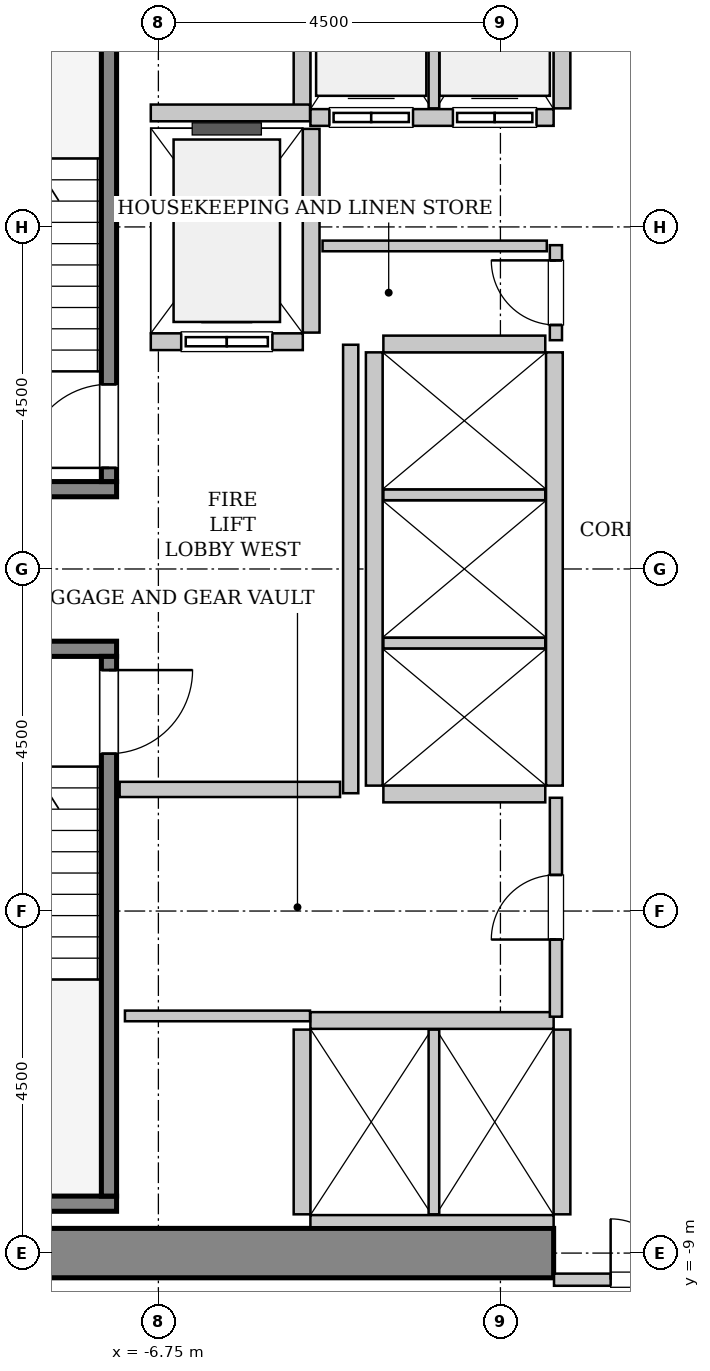
"""IFC4 building model, lengths in metres.
Left out: names, types, materials, properties, quantities, classifications, styles, units other than length and angle.
Written with IfcOpenShell. Run it as: python <this file> out.ifc"""

import sys

from ifc_helpers import new_model, si_unit, direction, frame, frame_2d, origin, place, context, subcontext, project, spatial, rectangle, extrude, source, transform, mapped, element, fill, save


model = new_model("IFC4")
c1 = context("Model", 3, precision=1e-05, world=origin(), true_north=direction((0.0, 1.0)))
c2 = subcontext(c1, "Body", "Model", "MODEL_VIEW")
j1 = project(units=[si_unit("LENGTHUNIT", "METRE"), si_unit("PLANEANGLEUNIT", "RADIAN")], contexts=[c1])
p1 = place(None, origin())
s1 = spatial("IfcSite", under=j1, at=p1, CompositionType="ELEMENT")
p2 = place(p1, origin())
s2 = spatial("IfcBuilding", under=s1, at=p2, CompositionType="ELEMENT")
p3 = place(p2, frame((0.0, 0.0, 67.2)))
s3 = spatial("IfcBuildingStorey", under=s2, at=p3, CompositionType="ELEMENT", Elevation=67.2)
m1 = source(origin(), c2, "Body", "SweptSolid", [
    extrude(rectangle(XDim=10.025, YDim=0.65, at=frame_2d((5.012, 0.0))), origin(), (0.0, 0.0, 1.0), 3.8),
])
p4 = place(p3, frame((-11.575, -9.0, 0.0), z_axis=(0.0, 0.0, 1.0), x_axis=(1.0, 0.0, 0.0)))
e1 = element("IfcWall", 1, at=p4, inside=s3, PredefinedType="SHEAR", context=c2, shape_type="MappedRepresentation", body=[
    mapped(m1, transform((0.0, 0.0, 0.0), x_axis=(1.0, 0.0, 0.0), y_axis=(0.0, 1.0, 0.0), z_axis=(0.0, 0.0, 1.0), scale=1.0)),
])
m2 = source(origin(), c2, "Body", "SweptSolid", [
    extrude(rectangle(XDim=3.4, YDim=0.2, at=frame_2d((1.7, 0.0))), origin(), (0.0, 0.0, 1.0), 3.8),
])
p5 = place(p3, frame((-7.3, 1.05, 0.0), z_axis=(0.0, 0.0, 1.0), x_axis=(-1.0, 0.0, 0.0)))
e2 = element("IfcWall", 2, at=p5, inside=s3, PredefinedType="SOLIDWALL", context=c2, shape_type="MappedRepresentation", body=[
    mapped(m2, transform((0.0, 0.0, 0.0), x_axis=(1.0, 0.0, 0.0), y_axis=(0.0, 1.0, 0.0), z_axis=(0.0, 0.0, 1.0), scale=1.0)),
])
m3 = source(origin(), c2, "Body", "SweptSolid", [
    extrude(rectangle(XDim=7.1, YDim=0.2, at=frame_2d((3.55, 0.0))), origin(), (0.0, 0.0, 1.0), 3.8),
])
p6 = place(p3, frame((-7.4, 1.15, 0.0), z_axis=(0.0, 0.0, 1.0), x_axis=(0.0, 1.0, 0.0)))
e3 = element("IfcWall", 3, at=p6, inside=s3, PredefinedType="SOLIDWALL", context=c2, shape_type="MappedRepresentation", body=[
    mapped(m3, transform((0.0, 0.0, 0.0), x_axis=(1.0, 0.0, 0.0), y_axis=(0.0, 1.0, 0.0), z_axis=(0.0, 0.0, 1.0), scale=1.0)),
])
p7 = place(p6, frame((0.18, 0.0, 0.0)))
e4 = element("IfcOpeningElement", 4, at=p7, cuts=e3, PredefinedType="OPENING", context=c2, shape_type="SweptSolid", body=[
    extrude(rectangle(XDim=1.1, YDim=2.15, at=frame_2d((0.55, 1.075))), frame((0.0, 0.11, 0.0), z_axis=(0.0, -1.0, 0.0), x_axis=(1.0, 0.0, 0.0)), (0.0, 0.0, 1.0), 0.22),
])
p8 = place(p3, frame((-10.7, -1.05, 0.0), z_axis=(0.0, 0.0, 1.0), x_axis=(1.0, 0.0, 0.0)))
e5 = element("IfcWall", 5, at=p8, inside=s3, PredefinedType="SOLIDWALL", context=c2, shape_type="MappedRepresentation", body=[
    mapped(m2, transform((0.0, 0.0, 0.0), x_axis=(1.0, 0.0, 0.0), y_axis=(0.0, 1.0, 0.0), z_axis=(0.0, 0.0, 1.0), scale=1.0)),
])
m4 = source(origin(), c2, "Body", "SweptSolid", [
    extrude(rectangle(XDim=3.63, YDim=0.2, at=frame_2d((1.815, 0.0))), origin(), (0.0, 0.0, 1.0), 3.8),
])
p9 = place(p3, frame((-10.93, -8.35, 0.0), z_axis=(0.0, 0.0, 1.0), x_axis=(1.0, 0.0, 0.0)))
e6 = element("IfcWall", 6, at=p9, inside=s3, PredefinedType="SOLIDWALL", context=c2, shape_type="MappedRepresentation", body=[
    mapped(m4, transform((0.0, 0.0, 0.0), x_axis=(1.0, 0.0, 0.0), y_axis=(0.0, 1.0, 0.0), z_axis=(0.0, 0.0, 1.0), scale=1.0)),
])
p10 = place(p3, frame((-7.4, -1.15, 0.0), z_axis=(0.0, 0.0, 1.0), x_axis=(0.0, -1.0, 0.0)))
e7 = element("IfcWall", 7, at=p10, inside=s3, PredefinedType="SOLIDWALL", context=c2, shape_type="MappedRepresentation", body=[
    mapped(m3, transform((0.0, 0.0, 0.0), x_axis=(1.0, 0.0, 0.0), y_axis=(0.0, 1.0, 0.0), z_axis=(0.0, 0.0, 1.0), scale=1.0)),
])
p11 = place(p10, frame((0.18, 0.0, 0.0)))
e8 = element("IfcOpeningElement", 8, at=p11, cuts=e7, PredefinedType="OPENING", context=c2, shape_type="SweptSolid", body=[
    extrude(rectangle(XDim=1.1, YDim=2.15, at=frame_2d((0.55, 1.075))), frame((0.0, 0.11, 0.0), z_axis=(0.0, -1.0, 0.0), x_axis=(1.0, 0.0, 0.0)), (0.0, 0.0, 1.0), 0.22),
])
m5 = source(origin(), c2, "Body", "SweptSolid", [
    extrude(rectangle(XDim=2.0, YDim=0.22, at=frame_2d((1.0, 0.0))), origin(), (0.0, 0.0, 1.0), 3.535),
])
p12 = place(p3, frame((-6.85, 2.99, 0.0), z_axis=(0.0, 0.0, 1.0), x_axis=(1.0, 0.0, 0.0)))
e9 = element("IfcWall", 9, at=p12, inside=s3, PredefinedType="SOLIDWALL", context=c2, shape_type="MappedRepresentation", body=[
    mapped(m5, transform((0.0, 0.0, 0.0), x_axis=(1.0, 0.0, 0.0), y_axis=(0.0, 1.0, 0.0), z_axis=(0.0, 0.0, 1.0), scale=1.0)),
])
p13 = place(p12, frame((0.4, 0.0, 0.0)))
e10 = element("IfcOpeningElement", 10, at=p13, cuts=e9, PredefinedType="OPENING", context=c2, shape_type="SweptSolid", body=[
    extrude(rectangle(XDim=1.2, YDim=2.2, at=frame_2d((0.6, 1.1))), frame((0.0, 0.12, 0.0), z_axis=(0.0, -1.0, 0.0), x_axis=(1.0, 0.0, 0.0)), (0.0, 0.0, 1.0), 0.24),
])
m6 = source(origin(), c2, "Body", "SweptSolid", [
    extrude(rectangle(XDim=2.68, YDim=0.22, at=frame_2d((1.34, 0.0))), origin(), (0.0, 0.0, 1.0), 3.535),
])
p14 = place(p3, frame((-4.74, 3.11, 0.0), z_axis=(0.0, 0.0, 1.0), x_axis=(0.0, 1.0, 0.0)))
e11 = element("IfcWall", 11, at=p14, inside=s3, PredefinedType="SOLIDWALL", context=c2, shape_type="MappedRepresentation", body=[
    mapped(m6, transform((0.0, 0.0, 0.0), x_axis=(1.0, 0.0, 0.0), y_axis=(0.0, 1.0, 0.0), z_axis=(0.0, 0.0, 1.0), scale=1.0)),
])
m7 = source(origin(), c2, "Body", "SweptSolid", [
    extrude(rectangle(XDim=3.2, YDim=0.22, at=frame_2d((1.6, 0.0))), origin(), (0.0, 0.0, 1.0), 3.535),
])
p15 = place(p3, frame((-4.75, 5.94, 0.0), z_axis=(0.0, 0.0, 1.0), x_axis=(1.0, 0.0, 0.0)))
e12 = element("IfcWall", 12, at=p15, inside=s3, PredefinedType="SOLIDWALL", context=c2, shape_type="MappedRepresentation", body=[
    mapped(m7, transform((0.0, 0.0, 0.0), x_axis=(1.0, 0.0, 0.0), y_axis=(0.0, 1.0, 0.0), z_axis=(0.0, 0.0, 1.0), scale=1.0)),
])
p16 = place(p15, frame((0.25, 0.0, 0.0)))
e13 = element("IfcOpeningElement", 13, at=p16, cuts=e12, PredefinedType="OPENING", context=c2, shape_type="SweptSolid", body=[
    extrude(rectangle(XDim=1.1, YDim=2.2, at=frame_2d((0.55, 1.1))), frame((0.0, 0.12, 0.0), z_axis=(0.0, -1.0, 0.0), x_axis=(1.0, 0.0, 0.0)), (0.0, 0.0, 1.0), 0.24),
])
p17 = place(p15, frame((1.875, 0.0, 0.0)))
e14 = element("IfcOpeningElement", 14, at=p17, cuts=e12, PredefinedType="OPENING", context=c2, shape_type="SweptSolid", body=[
    extrude(rectangle(XDim=1.1, YDim=2.2, at=frame_2d((0.55, 1.1))), frame((0.0, 0.12, 0.0), z_axis=(0.0, -1.0, 0.0), x_axis=(1.0, 0.0, 0.0)), (0.0, 0.0, 1.0), 0.24),
])
m8 = source(origin(), c2, "Body", "SweptSolid", [
    extrude(rectangle(XDim=2.43, YDim=0.22, at=frame_2d((1.215, 0.0))), origin(), (0.0, 0.0, 1.0), 3.535),
])
p18 = place(p3, frame((-4.86, 8.49, 0.0), z_axis=(0.0, 0.0, 1.0), x_axis=(0.0, -1.0, 0.0)))
e15 = element("IfcWall", 15, at=p18, inside=s3, PredefinedType="SOLIDWALL", context=c2, shape_type="MappedRepresentation", body=[
    mapped(m8, transform((0.0, 0.0, 0.0), x_axis=(1.0, 0.0, 0.0), y_axis=(0.0, 1.0, 0.0), z_axis=(0.0, 0.0, 1.0), scale=1.0)),
])
m9 = source(origin(), c2, "Body", "SweptSolid", [
    extrude(rectangle(XDim=2.43, YDim=0.14, at=frame_2d((1.215, 0.0))), origin(), (0.0, 0.0, 1.0), 3.535),
])
p19 = place(p3, frame((-3.125, 6.06, 0.0), z_axis=(0.0, 0.0, 1.0), x_axis=(0.0, 1.0, 0.0)))
e16 = element("IfcWall", 16, at=p19, inside=s3, PredefinedType="PARTITIONING", context=c2, shape_type="MappedRepresentation", body=[
    mapped(m9, transform((0.0, 0.0, 0.0), x_axis=(1.0, 0.0, 0.0), y_axis=(0.0, 1.0, 0.0), z_axis=(0.0, 0.0, 1.0), scale=1.0)),
])
p20 = place(p3, frame((-1.44, 6.06, 0.0), z_axis=(0.0, 0.0, 1.0), x_axis=(0.0, 1.0, 0.0)))
e17 = element("IfcWall", 17, at=p20, inside=s3, PredefinedType="SOLIDWALL", context=c2, shape_type="MappedRepresentation", body=[
    mapped(m8, transform((0.0, 0.0, 0.0), x_axis=(1.0, 0.0, 0.0), y_axis=(0.0, 1.0, 0.0), z_axis=(0.0, 0.0, 1.0), scale=1.0)),
])
p21 = place(p3, frame((-1.55, -5.94, 0.0), z_axis=(0.0, 0.0, 1.0), x_axis=(-1.0, 0.0, 0.0)))
e18 = element("IfcWall", 18, at=p21, inside=s3, PredefinedType="SOLIDWALL", context=c2, shape_type="MappedRepresentation", body=[
    mapped(m7, transform((0.0, 0.0, 0.0), x_axis=(1.0, 0.0, 0.0), y_axis=(0.0, 1.0, 0.0), z_axis=(0.0, 0.0, 1.0), scale=1.0)),
])
m10 = source(origin(), c2, "Body", "SweptSolid", [
    extrude(rectangle(XDim=3.2, YDim=0.16, at=frame_2d((1.6, 0.0))), origin(), (0.0, 0.0, 1.0), 2.425),
])
p22 = place(p3, frame((-4.75, -8.58, 0.0), z_axis=(0.0, 0.0, 1.0), x_axis=(1.0, 0.0, 0.0)))
e19 = element("IfcWall", 19, at=p22, inside=s3, PredefinedType="PARTITIONING", context=c2, shape_type="MappedRepresentation", body=[
    mapped(m10, transform((0.0, 0.0, 0.0), x_axis=(1.0, 0.0, 0.0), y_axis=(0.0, 1.0, 0.0), z_axis=(0.0, 0.0, 1.0), scale=1.0)),
])
p23 = place(p3, frame((-4.86, -6.06, 0.0), z_axis=(0.0, 0.0, 1.0), x_axis=(0.0, -1.0, 0.0)))
e20 = element("IfcWall", 20, at=p23, inside=s3, PredefinedType="SOLIDWALL", context=c2, shape_type="MappedRepresentation", body=[
    mapped(m8, transform((0.0, 0.0, 0.0), x_axis=(1.0, 0.0, 0.0), y_axis=(0.0, 1.0, 0.0), z_axis=(0.0, 0.0, 1.0), scale=1.0)),
])
p24 = place(p3, frame((-3.125, -8.49, 0.0), z_axis=(0.0, 0.0, 1.0), x_axis=(0.0, 1.0, 0.0)))
e21 = element("IfcWall", 21, at=p24, inside=s3, PredefinedType="PARTITIONING", context=c2, shape_type="MappedRepresentation", body=[
    mapped(m9, transform((0.0, 0.0, 0.0), x_axis=(1.0, 0.0, 0.0), y_axis=(0.0, 1.0, 0.0), z_axis=(0.0, 0.0, 1.0), scale=1.0)),
])
p25 = place(p3, frame((-1.44, -8.49, 0.0), z_axis=(0.0, 0.0, 1.0), x_axis=(0.0, 1.0, 0.0)))
e22 = element("IfcWall", 22, at=p25, inside=s3, PredefinedType="SOLIDWALL", context=c2, shape_type="MappedRepresentation", body=[
    mapped(m8, transform((0.0, 0.0, 0.0), x_axis=(1.0, 0.0, 0.0), y_axis=(0.0, 1.0, 0.0), z_axis=(0.0, 0.0, 1.0), scale=1.0)),
])
m11 = source(origin(), c2, "Body", "SweptSolid", [
    extrude(rectangle(XDim=5.7, YDim=0.22, at=frame_2d((2.85, 0.0))), origin(), (0.0, 0.0, 1.0), 3.535),
])
for number, where, z_axis, x_axis in (
    (23, (-1.54, -2.85, 0.0), (0.0, 0.0, 1.0), (0.0, 1.0, 0.0)),
    (24, (-3.91, 2.85, 0.0), (0.0, 0.0, 1.0), (0.0, -1.0, 0.0)),
):
    element("IfcWall", number, at=place(p3, frame(where, z_axis=z_axis, x_axis=x_axis)), inside=s3, PredefinedType="SOLIDWALL", context=c2, shape_type="MappedRepresentation", body=[
        mapped(m11, transform((0.0, 0.0, 0.0), x_axis=(1.0, 0.0, 0.0), y_axis=(0.0, 1.0, 0.0), z_axis=(0.0, 0.0, 1.0), scale=1.0)),
    ])
m12 = source(origin(), c2, "Body", "SweptSolid", [
    extrude(rectangle(XDim=2.13, YDim=0.22, at=frame_2d((1.065, 0.0))), origin(), (0.0, 0.0, 1.0), 3.535),
])
p26 = place(p3, frame((-3.79, -2.96, 0.0), z_axis=(0.0, 0.0, 1.0), x_axis=(1.0, 0.0, 0.0)))
e25 = element("IfcWall", 25, at=p26, inside=s3, PredefinedType="SOLIDWALL", context=c2, shape_type="MappedRepresentation", body=[
    mapped(m12, transform((0.0, 0.0, 0.0), x_axis=(1.0, 0.0, 0.0), y_axis=(0.0, 1.0, 0.0), z_axis=(0.0, 0.0, 1.0), scale=1.0)),
])
m13 = source(origin(), c2, "Body", "SweptSolid", [
    extrude(rectangle(XDim=2.13, YDim=0.14, at=frame_2d((1.065, 0.0))), origin(), (0.0, 0.0, 1.0), 3.535),
])
for number, where, z_axis, x_axis in (
    (26, (-3.79, -0.975, 0.0), (0.0, 0.0, 1.0), (1.0, 0.0, 0.0)),
    (27, (-3.79, 0.975, 0.0), (0.0, 0.0, 1.0), (1.0, 0.0, 0.0)),
):
    element("IfcWall", number, at=place(p3, frame(where, z_axis=z_axis, x_axis=x_axis)), inside=s3, PredefinedType="PARTITIONING", context=c2, shape_type="MappedRepresentation", body=[
        mapped(m13, transform((0.0, 0.0, 0.0), x_axis=(1.0, 0.0, 0.0), y_axis=(0.0, 1.0, 0.0), z_axis=(0.0, 0.0, 1.0), scale=1.0)),
    ])
p27 = place(p3, frame((-1.66, 2.96, 0.0), z_axis=(0.0, 0.0, 1.0), x_axis=(-1.0, 0.0, 0.0)))
e28 = element("IfcWall", 28, at=p27, inside=s3, PredefinedType="SOLIDWALL", context=c2, shape_type="MappedRepresentation", body=[
    mapped(m12, transform((0.0, 0.0, 0.0), x_axis=(1.0, 0.0, 0.0), y_axis=(0.0, 1.0, 0.0), z_axis=(0.0, 0.0, 1.0), scale=1.0)),
])
m14 = source(origin(), c2, "Body", "SweptSolid", [
    extrude(rectangle(XDim=2.095, YDim=0.22, at=frame_2d((1.048, 0.0))), origin(), (0.0, 0.0, 1.0), 3.535),
])
p28 = place(p3, frame((-6.85, 6.0, 0.0), z_axis=(0.0, 0.0, 1.0), x_axis=(1.0, 0.0, 0.0)))
e29 = element("IfcWall", 29, at=p28, inside=s3, PredefinedType="SOLIDWALL", context=c2, shape_type="MappedRepresentation", body=[
    mapped(m14, transform((0.0, 0.0, 0.0), x_axis=(1.0, 0.0, 0.0), y_axis=(0.0, 1.0, 0.0), z_axis=(0.0, 0.0, 1.0), scale=1.0)),
])
m15 = source(origin(), c2, "Body", "SweptSolid", [
    extrude(rectangle(XDim=5.9, YDim=0.2, at=frame_2d((2.95, 0.0))), origin(), (0.0, 0.0, 1.0), 3.535),
])
p29 = place(p3, frame((-4.22, -2.95, 0.0), z_axis=(0.0, 0.0, 1.0), x_axis=(0.0, 1.0, 0.0)))
e30 = element("IfcWall", 30, at=p29, inside=s3, PredefinedType="PARTITIONING", context=c2, shape_type="MappedRepresentation", body=[
    mapped(m15, transform((0.0, 0.0, 0.0), x_axis=(1.0, 0.0, 0.0), y_axis=(0.0, 1.0, 0.0), z_axis=(0.0, 0.0, 1.0), scale=1.0)),
])
m16 = source(origin(), c2, "Body", "SweptSolid", [
    extrude(rectangle(XDim=2.9, YDim=0.2, at=frame_2d((1.45, 0.0))), origin(), (0.0, 0.0, 1.0), 3.535),
])
p30 = place(p3, frame((-7.26, -2.9, 0.0), z_axis=(0.0, 0.0, 1.0), x_axis=(1.0, 0.0, 0.0)))
e31 = element("IfcWall", 31, at=p30, inside=s3, PredefinedType="PARTITIONING", context=c2, shape_type="MappedRepresentation", body=[
    mapped(m16, transform((0.0, 0.0, 0.0), x_axis=(1.0, 0.0, 0.0), y_axis=(0.0, 1.0, 0.0), z_axis=(0.0, 0.0, 1.0), scale=1.0)),
])
m17 = source(origin(), c2, "Body", "SweptSolid", [
    extrude(rectangle(XDim=3.09, YDim=0.16, at=frame_2d((1.545, 0.0))), origin(), (0.0, 0.0, 1.0), 2.425),
])
p31 = place(p3, frame((-1.545, -9.35, 0.0), z_axis=(0.0, 0.0, 1.0), x_axis=(1.0, 0.0, 0.0)))
e32 = element("IfcWall", 32, at=p31, inside=s3, PredefinedType="PARTITIONING", context=c2, shape_type="MappedRepresentation", body=[
    mapped(m17, transform((0.0, 0.0, 0.0), x_axis=(1.0, 0.0, 0.0), y_axis=(0.0, 1.0, 0.0), z_axis=(0.0, 0.0, 1.0), scale=1.0)),
])
p32 = place(p31, frame((0.745, 0.0, 0.0)))
e33 = element("IfcOpeningElement", 33, at=p32, cuts=e32, PredefinedType="OPENING", context=c2, shape_type="SweptSolid", body=[
    extrude(rectangle(XDim=1.6, YDim=2.3, at=frame_2d((0.8, 1.15))), frame((0.0, 0.09, 0.0), z_axis=(0.0, -1.0, 0.0), x_axis=(1.0, 0.0, 0.0)), (0.0, 0.0, 1.0), 0.18),
])
m18 = source(origin(), c2, "Body", "SweptSolid", [
    extrude(rectangle(XDim=1.25, YDim=0.16, at=frame_2d((0.625, 0.0))), origin(), (0.0, 0.0, 1.0), 3.535),
])
p33 = place(p3, frame((-1.52, 3.01, 0.0), z_axis=(0.0, 0.0, 1.0), x_axis=(0.0, 1.0, 0.0)))
e34 = element("IfcWall", 34, at=p33, inside=s3, PredefinedType="PARTITIONING", context=c2, shape_type="MappedRepresentation", body=[
    mapped(m18, transform((0.0, 0.0, 0.0), x_axis=(1.0, 0.0, 0.0), y_axis=(0.0, 1.0, 0.0), z_axis=(0.0, 0.0, 1.0), scale=1.0)),
])
p34 = place(p33, frame((0.2, 0.0, 0.0)))
e35 = element("IfcOpeningElement", 35, at=p34, cuts=e34, PredefinedType="OPENING", context=c2, shape_type="SweptSolid", body=[
    extrude(rectangle(XDim=0.85, YDim=2.1, at=frame_2d((0.425, 1.05))), frame((0.0, 0.09, 0.0), z_axis=(0.0, -1.0, 0.0), x_axis=(1.0, 0.0, 0.0)), (0.0, 0.0, 1.0), 0.18),
])
m19 = source(origin(), c2, "Body", "SweptSolid", [
    extrude(rectangle(XDim=2.95, YDim=0.14, at=frame_2d((1.475, 0.0))), origin(), (0.0, 0.0, 1.0), 3.535),
])
p35 = place(p3, frame((-4.59, 4.25, 0.0), z_axis=(0.0, 0.0, 1.0), x_axis=(1.0, 0.0, 0.0)))
e36 = element("IfcWall", 36, at=p35, inside=s3, PredefinedType="PARTITIONING", context=c2, shape_type="MappedRepresentation", body=[
    mapped(m19, transform((0.0, 0.0, 0.0), x_axis=(1.0, 0.0, 0.0), y_axis=(0.0, 1.0, 0.0), z_axis=(0.0, 0.0, 1.0), scale=1.0)),
])
m20 = source(origin(), c2, "Body", "SweptSolid", [
    extrude(rectangle(XDim=2.88, YDim=0.16, at=frame_2d((1.44, 0.0))), origin(), (0.0, 0.0, 1.0), 3.535),
])
p36 = place(p3, frame((-1.52, -5.89, 0.0), z_axis=(0.0, 0.0, 1.0), x_axis=(0.0, 1.0, 0.0)))
e37 = element("IfcWall", 37, at=p36, inside=s3, PredefinedType="PARTITIONING", context=c2, shape_type="MappedRepresentation", body=[
    mapped(m20, transform((0.0, 0.0, 0.0), x_axis=(1.0, 0.0, 0.0), y_axis=(0.0, 1.0, 0.0), z_axis=(0.0, 0.0, 1.0), scale=1.0)),
])
p37 = place(p36, frame((1.015, 0.0, 0.0)))
e38 = element("IfcOpeningElement", 38, at=p37, cuts=e37, PredefinedType="OPENING", context=c2, shape_type="SweptSolid", body=[
    extrude(rectangle(XDim=0.85, YDim=2.1, at=frame_2d((0.425, 1.05))), frame((0.0, 0.09, 0.0), z_axis=(0.0, -1.0, 0.0), x_axis=(1.0, 0.0, 0.0)), (0.0, 0.0, 1.0), 0.18),
])
m21 = source(origin(), c2, "Body", "SweptSolid", [
    extrude(rectangle(XDim=2.435, YDim=0.14, at=frame_2d((1.218, 0.0))), origin(), (0.0, 0.0, 1.0), 3.535),
])
p38 = place(p3, frame((-7.19, -5.88, 0.0), z_axis=(0.0, 0.0, 1.0), x_axis=(1.0, 0.0, 0.0)))
e39 = element("IfcWall", 39, at=p38, inside=s3, PredefinedType="PARTITIONING", context=c2, shape_type="MappedRepresentation", body=[
    mapped(m21, transform((0.0, 0.0, 0.0), x_axis=(1.0, 0.0, 0.0), y_axis=(0.0, 1.0, 0.0), z_axis=(0.0, 0.0, 1.0), scale=1.0)),
])
m22 = source(origin(), c2, "Body", "SweptSolid", [
    extrude(rectangle(XDim=1.1, YDim=2.15, at=frame_2d((0.55, 1.075))), frame((0.0, 0.025, 0.0), z_axis=(0.0, -1.0, 0.0), x_axis=(1.0, 0.0, 0.0)), (0.0, 0.0, 1.0), 0.05),
])
p39 = place(p7, origin())
e40 = element("IfcDoor", 40, at=p39, inside=s3, OperationType="SINGLE_SWING_LEFT", PredefinedType="DOOR", context=c2, shape_type="MappedRepresentation", body=[
    mapped(m22, transform((0.0, 0.0, 0.0), x_axis=(1.0, 0.0, 0.0), y_axis=(0.0, 1.0, 0.0), z_axis=(0.0, 0.0, 1.0), scale=1.0)),
])
fill(e4, e40)
p40 = place(p11, origin())
e41 = element("IfcDoor", 41, at=p40, inside=s3, OperationType="SINGLE_SWING_LEFT", PredefinedType="DOOR", context=c2, shape_type="MappedRepresentation", body=[
    mapped(m22, transform((0.0, 0.0, 0.0), x_axis=(1.0, 0.0, 0.0), y_axis=(0.0, 1.0, 0.0), z_axis=(0.0, 0.0, 1.0), scale=1.0)),
])
fill(e8, e41)
m23 = source(origin(), c2, "Body", "SweptSolid", [
    extrude(rectangle(XDim=1.2, YDim=2.2, at=frame_2d((0.6, 1.1))), frame((0.0, 0.025, 0.0), z_axis=(0.0, -1.0, 0.0), x_axis=(1.0, 0.0, 0.0)), (0.0, 0.0, 1.0), 0.05),
])
p41 = place(p13, origin())
e42 = element("IfcDoor", 42, at=p41, inside=s3, OperationType="SLIDING_TO_LEFT", PredefinedType="DOOR", context=c2, shape_type="MappedRepresentation", body=[
    mapped(m23, transform((0.0, 0.0, 0.0), x_axis=(1.0, 0.0, 0.0), y_axis=(0.0, 1.0, 0.0), z_axis=(0.0, 0.0, 1.0), scale=1.0)),
])
fill(e10, e42)
m24 = source(origin(), c2, "Body", "SweptSolid", [
    extrude(rectangle(XDim=1.1, YDim=2.2, at=frame_2d((0.55, 1.1))), frame((0.0, 0.025, 0.0), z_axis=(0.0, -1.0, 0.0), x_axis=(1.0, 0.0, 0.0)), (0.0, 0.0, 1.0), 0.05),
])
p42 = place(p16, origin())
e43 = element("IfcDoor", 43, at=p42, inside=s3, OperationType="DOUBLE_DOOR_SLIDING", PredefinedType="DOOR", context=c2, shape_type="MappedRepresentation", body=[
    mapped(m24, transform((0.0, 0.0, 0.0), x_axis=(1.0, 0.0, 0.0), y_axis=(0.0, 1.0, 0.0), z_axis=(0.0, 0.0, 1.0), scale=1.0)),
])
fill(e13, e43)
p43 = place(p17, origin())
e44 = element("IfcDoor", 44, at=p43, inside=s3, OperationType="DOUBLE_DOOR_SLIDING", PredefinedType="DOOR", context=c2, shape_type="MappedRepresentation", body=[
    mapped(m24, transform((0.0, 0.0, 0.0), x_axis=(1.0, 0.0, 0.0), y_axis=(0.0, 1.0, 0.0), z_axis=(0.0, 0.0, 1.0), scale=1.0)),
])
fill(e14, e44)
m25 = source(origin(), c2, "Body", "SweptSolid", [
    extrude(rectangle(XDim=1.6, YDim=2.3, at=frame_2d((0.8, 1.15))), frame((0.0, 0.025, 0.0), z_axis=(0.0, -1.0, 0.0), x_axis=(1.0, 0.0, 0.0)), (0.0, 0.0, 1.0), 0.05),
])
p44 = place(p32, origin())
e45 = element("IfcDoor", 45, at=p44, inside=s3, OperationType="DOUBLE_DOOR_SINGLE_SWING", PredefinedType="DOOR", context=c2, shape_type="MappedRepresentation", body=[
    mapped(m25, transform((0.0, 0.0, 0.0), x_axis=(1.0, 0.0, 0.0), y_axis=(0.0, 1.0, 0.0), z_axis=(0.0, 0.0, 1.0), scale=1.0)),
])
fill(e33, e45)
m26 = source(origin(), c2, "Body", "SweptSolid", [
    extrude(rectangle(XDim=0.85, YDim=2.1, at=frame_2d((0.425, 1.05))), frame((0.0, 0.025, 0.0), z_axis=(0.0, -1.0, 0.0), x_axis=(1.0, 0.0, 0.0)), (0.0, 0.0, 1.0), 0.05),
])
p45 = place(p34, origin())
e46 = element("IfcDoor", 46, at=p45, inside=s3, OperationType="SINGLE_SWING_RIGHT", PredefinedType="DOOR", context=c2, shape_type="MappedRepresentation", body=[
    mapped(m26, transform((0.0, 0.0, 0.0), x_axis=(1.0, 0.0, 0.0), y_axis=(0.0, 1.0, 0.0), z_axis=(0.0, 0.0, 1.0), scale=1.0)),
])
fill(e35, e46)
p46 = place(p37, origin())
e47 = element("IfcDoor", 47, at=p46, inside=s3, OperationType="SINGLE_SWING_LEFT", PredefinedType="DOOR", context=c2, shape_type="MappedRepresentation", body=[
    mapped(m26, transform((0.0, 0.0, 0.0), x_axis=(1.0, 0.0, 0.0), y_axis=(0.0, 1.0, 0.0), z_axis=(0.0, 0.0, 1.0), scale=1.0)),
])
fill(e38, e47)
save(model, sys.argv[1])
